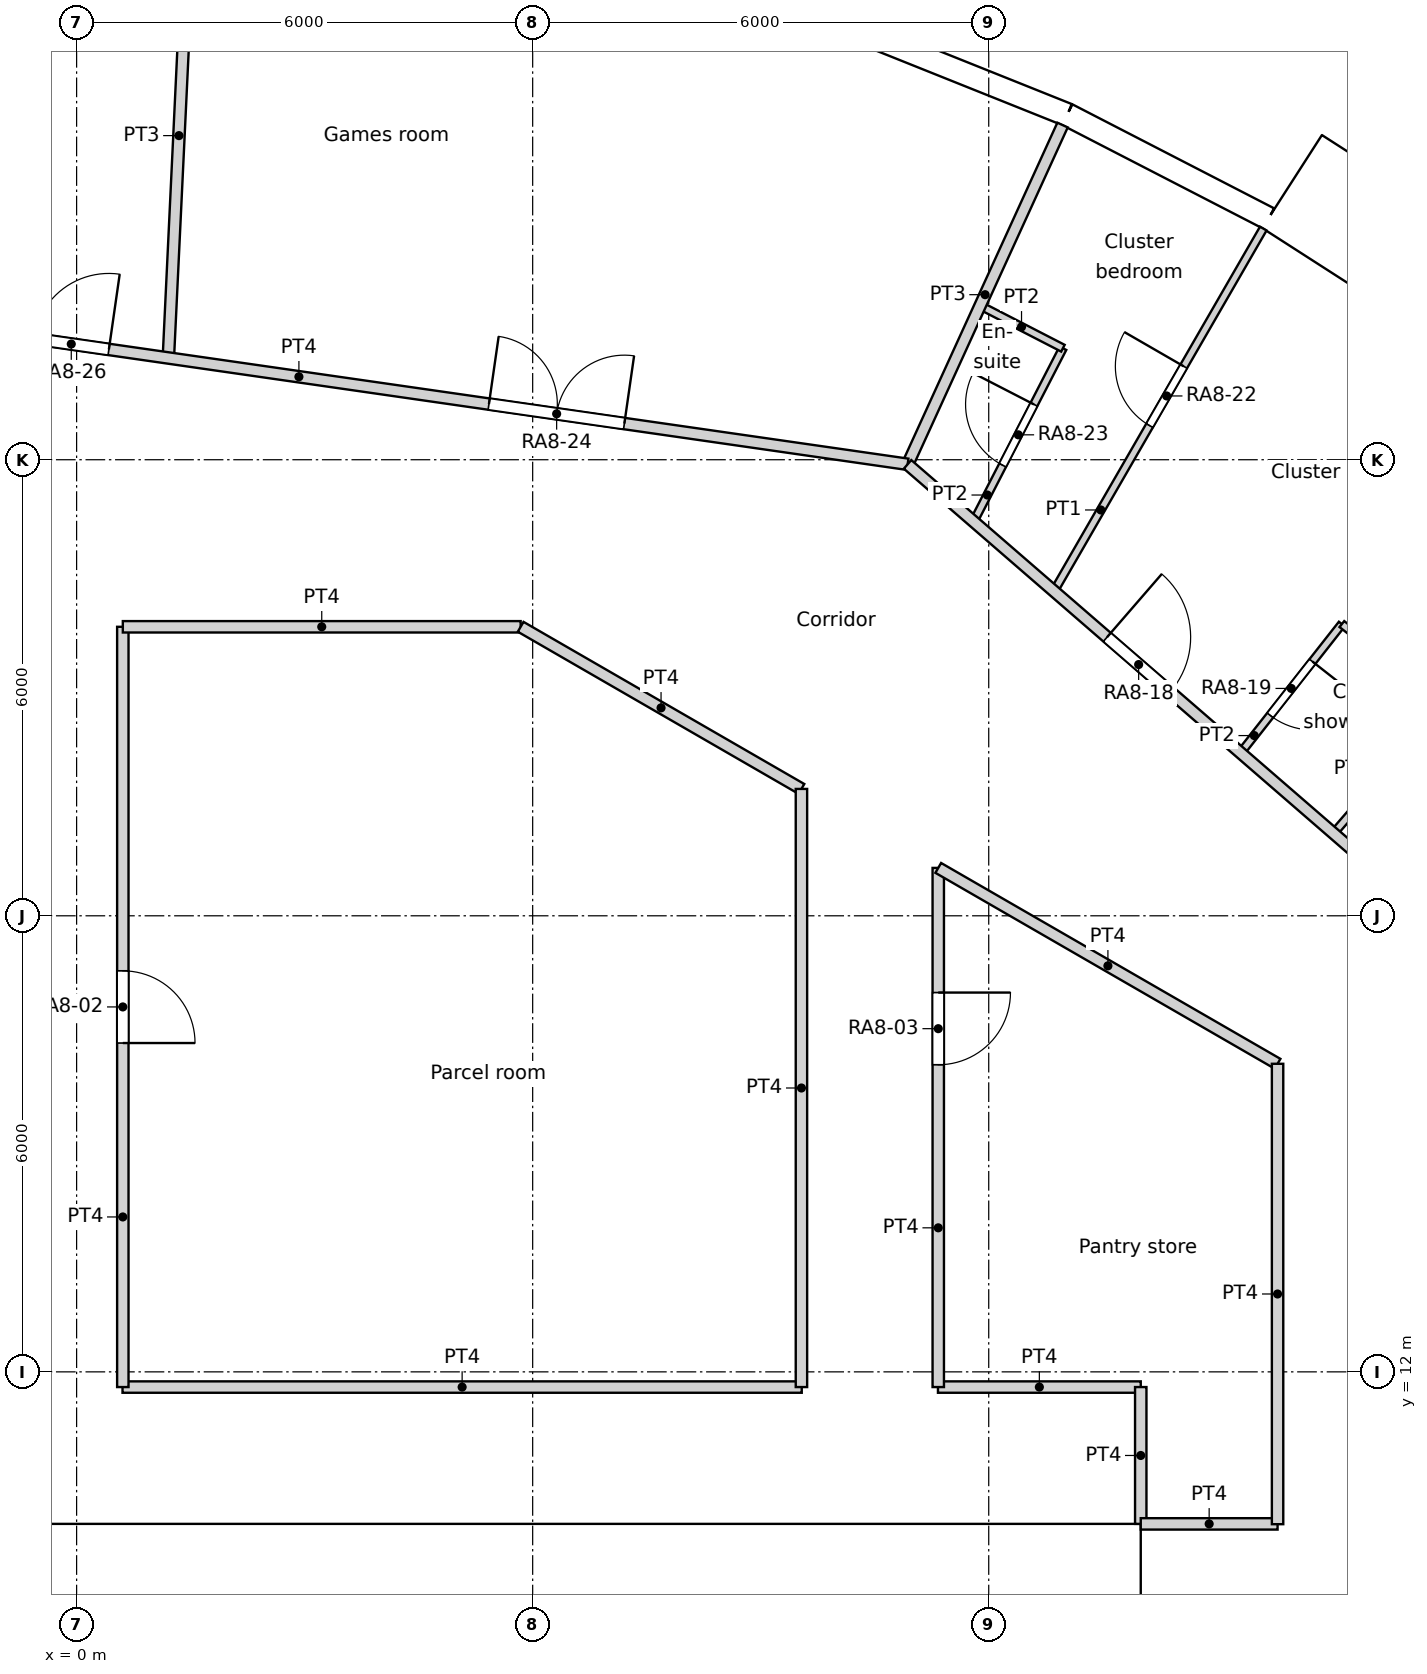
"""IFC4 building model, lengths in metres.
Left out: names, types, materials, properties, quantities, classifications, styles, units other than length and angle.
Written with IfcOpenShell. Run it as: python <this file> out.ifc"""

import sys

from ifc_helpers import new_model, si_unit, direction, frame, frame_2d, origin, origin_2d, place, context, subcontext, project, spatial, rectangle, circle, extrude, element, fill, save


model = new_model("IFC4")
c1 = context("Model", 3, precision=1e-05, world=origin(), true_north=direction((0.0, 1.0)))
c2 = subcontext(c1, "Body", "Model", "MODEL_VIEW")
j1 = project(units=[si_unit("LENGTHUNIT", "METRE"), si_unit("PLANEANGLEUNIT", "RADIAN")], contexts=[c1])
p1 = place(None, origin())
s1 = spatial("IfcSite", under=j1, at=p1, CompositionType="ELEMENT")
p2 = place(p1, origin())
s2 = spatial("IfcBuilding", under=s1, at=p2, CompositionType="ELEMENT")
p3 = place(p2, frame((0.0, 0.0, 103.8)))
s3 = spatial("IfcBuildingStorey", under=s2, at=p3, CompositionType="ELEMENT", Elevation=103.8)
for number, where, z_axis, x_axis in (
    (1, (12.576, 27.539, 0.0), (0.0, 0.0, 1.0), (1.0, 0.0, 0.0)),
    (2, (7.137, 29.421, 0.0), (0.0, 0.0, 1.0), (1.0, 0.0, 0.0)),
):
    element("IfcColumn", number, at=place(p3, frame(where, z_axis=z_axis, x_axis=x_axis)), inside=s3, PredefinedType="COLUMN", context=c2, shape_type="SweptSolid", body=[
        extrude(circle(Radius=0.6, at=origin_2d()), origin(), (0.0, 0.0, 1.0), 3.6),
    ])
for number, where, z_axis, x_axis in (
    (3, (14.659, 19.69, 0.0), (0.0, 0.0, 1.0), (1.0, 0.0, 0.0)),
    (4, (9.723, 22.54, 0.0), (0.0, 0.0, 1.0), (1.0, 0.0, 0.0)),
    (5, (4.263, 24.175, 0.0), (0.0, 0.0, 1.0), (1.0, 0.0, 0.0)),
):
    element("IfcColumn", number, at=place(p3, frame(where, z_axis=z_axis, x_axis=x_axis)), inside=s3, PredefinedType="COLUMN", context=c2, shape_type="SweptSolid", body=[
        extrude(circle(Radius=0.65, at=origin_2d()), origin(), (0.0, 0.0, 1.0), 3.6),
    ])
for number, where, z_axis, x_axis in (
    (6, (15.552, 10.603, 0.0), (0.0, 0.0, 1.0), (1.0, 0.0, 0.0)),
    (7, (11.735, 14.716, 0.0), (0.0, 0.0, 1.0), (1.0, 0.0, 0.0)),
    (8, (6.876, 17.521, 0.0), (0.0, 0.0, 1.0), (1.0, 0.0, 0.0)),
    (9, (1.406, 18.77, 0.0), (0.0, 0.0, 1.0), (1.0, 0.0, 0.0)),
):
    element("IfcColumn", number, at=place(p3, frame(where, z_axis=z_axis, x_axis=x_axis)), inside=s3, PredefinedType="COLUMN", context=c2, shape_type="SweptSolid", body=[
        extrude(circle(Radius=0.7, at=origin_2d()), origin(), (0.0, 0.0, 1.0), 3.6),
    ])
p4 = place(p3, frame((18.516, 26.037, -0.45), z_axis=(0.0, 0.0, 1.0), x_axis=(-0.841223422347, 0.540687667415, 0.0)))
e10 = element("IfcWall", 10, at=p4, inside=s3, PredefinedType="ELEMENTEDWALL", context=c2, shape_type="SweptSolid", body=[
    extrude(rectangle(XDim=3.0, YDim=1.45, at=frame_2d((1.5, 0.0))), origin(), (0.0, 0.0, 1.0), 3.6),
])
p5 = place(p4, frame((1.5, 0.0, 2.0)))
e11 = element("IfcOpeningElement", 11, at=p5, cuts=e10, PredefinedType="OPENING", context=c2, shape_type="SweptSolid", body=[
    extrude(circle(Radius=0.9, at=origin_2d()), frame((0.0, 0.735, 0.0), z_axis=(0.0, -1.0, 0.0), x_axis=(1.0, 0.0, 0.0)), (0.0, 0.0, 1.0), 1.47),
])
p6 = place(p3, frame((15.682, 27.174, 0.0), z_axis=(0.0, 0.0, 1.0), x_axis=(-0.888819853856, 0.458256770153, 0.0)))
e12 = element("IfcWall", 12, at=p6, inside=s3, PredefinedType="SOLIDWALL", context=c2, shape_type="SweptSolid", body=[
    extrude(rectangle(XDim=2.98, YDim=0.3, at=frame_2d((1.49, 0.0))), origin(), (0.0, 0.0, 1.0), 3.15),
])
p7 = place(p6, frame((1.49, 0.0, 1.55)))
e13 = element("IfcOpeningElement", 13, at=p7, cuts=e12, PredefinedType="OPENING", context=c2, shape_type="SweptSolid", body=[
    extrude(circle(Radius=0.9, at=origin_2d()), frame((0.0, 0.16, 0.0), z_axis=(0.0, -1.0, 0.0), x_axis=(1.0, 0.0, 0.0)), (0.0, 0.0, 1.0), 0.32),
])
p8 = place(p3, frame((13.033, 28.539, 0.0), z_axis=(0.0, 0.0, 1.0), x_axis=(-0.928403213937, 0.371574316054, 0.0)))
e14 = element("IfcWall", 14, at=p8, inside=s3, PredefinedType="SOLIDWALL", context=c2, shape_type="SweptSolid", body=[
    extrude(rectangle(XDim=2.98, YDim=0.3, at=frame_2d((1.49, 0.0))), origin(), (0.0, 0.0, 1.0), 3.15),
])
p9 = place(p8, frame((1.49, 0.0, 1.55)))
e15 = element("IfcOpeningElement", 15, at=p9, cuts=e14, PredefinedType="OPENING", context=c2, shape_type="SweptSolid", body=[
    extrude(circle(Radius=0.9, at=origin_2d()), frame((0.0, 0.16, 0.0), z_axis=(0.0, -1.0, 0.0), x_axis=(1.0, 0.0, 0.0)), (0.0, 0.0, 1.0), 0.32),
])
p10 = place(p3, frame((-14.0, 9.4, 0.0), z_axis=(0.0, 0.0, 1.0), x_axis=(1.0, 0.0, 0.0)))
e16 = element("IfcWall", 16, at=p10, inside=s3, PredefinedType="SOLIDWALL", context=c2, shape_type="SweptSolid", body=[
    extrude(rectangle(XDim=28.0, YDim=1.2, at=frame_2d((14.0, 0.0))), origin(), (0.0, 0.0, 1.0), 3.6),
])
p11 = place(p10, frame((9.8, 0.0, 0.0)))
e17 = element("IfcOpeningElement", 17, at=p11, cuts=e16, PredefinedType="OPENING", context=c2, shape_type="SweptSolid", body=[
    extrude(rectangle(XDim=1.8, YDim=2.1, at=frame_2d((0.9, 1.05))), frame((0.0, 0.6, 0.0), z_axis=(0.0, -1.0, 0.0), x_axis=(1.0, 0.0, 0.0)), (0.0, 0.0, 1.0), 1.2),
])
p12 = place(p3, frame((0.604, 11.8, 0.0), z_axis=(0.0, 0.0, 1.0), x_axis=(1.0, 0.0, 0.0)))
e18 = element("IfcWall", 18, at=p12, inside=s3, PredefinedType="PARTITIONING", context=c2, shape_type="SweptSolid", body=[
    extrude(rectangle(XDim=8.936, YDim=0.15, at=frame_2d((4.468, 0.0))), origin(), (0.0, 0.0, 1.0), 3.15),
])
p13 = place(p3, frame((11.332, 11.8, 0.0), z_axis=(0.0, 0.0, 1.0), x_axis=(1.0, 0.0, 0.0)))
e19 = element("IfcWall", 19, at=p13, inside=s3, PredefinedType="PARTITIONING", context=c2, shape_type="SweptSolid", body=[
    extrude(rectangle(XDim=2.668, YDim=0.15, at=frame_2d((1.334, 0.0))), origin(), (0.0, 0.0, 1.0), 3.15),
])
for number, where, z_axis, x_axis in (
    (20, (14.0, 10.0, 0.0), (0.0, 0.0, 1.0), (0.0, 1.0, 0.0)),
    (21, (14.0, 10.0, 0.0), (0.0, 0.0, 1.0), (1.0, 0.0, 0.0)),
):
    element("IfcWall", number, at=place(p3, frame(where, z_axis=z_axis, x_axis=x_axis)), inside=s3, PredefinedType="PARTITIONING", context=c2, shape_type="SweptSolid", body=[
        extrude(rectangle(XDim=1.8, YDim=0.15, at=frame_2d((0.9, 0.0))), origin(), (0.0, 0.0, 1.0), 3.15),
    ])
p14 = place(p3, frame((15.8, 9.996, 0.0), z_axis=(0.0, 0.0, 1.0), x_axis=(0.0, 1.0, 0.0)))
e22 = element("IfcWall", 22, at=p14, inside=s3, PredefinedType="PARTITIONING", context=c2, shape_type="SweptSolid", body=[
    extrude(rectangle(XDim=6.057, YDim=0.15, at=frame_2d((3.028, 0.0))), origin(), (0.0, 0.0, 1.0), 3.15),
])
p15 = place(p3, frame((10.932, 23.939, 0.0), z_axis=(0.0, 0.0, 1.0), x_axis=(0.755838982892, -0.654757536757, 0.0)))
e23 = element("IfcWall", 23, at=p15, inside=s3, PredefinedType="PARTITIONING", context=c2, shape_type="SweptSolid", body=[
    extrude(rectangle(XDim=14.83, YDim=0.15, at=frame_2d((7.415, 0.0))), origin(), (0.0, 0.0, 1.0), 3.15),
])
p16 = place(p15, frame((12.796, 0.0, 0.0)))
e24 = element("IfcOpeningElement", 24, at=p16, cuts=e23, PredefinedType="OPENING", context=c2, shape_type="SweptSolid", body=[
    extrude(rectangle(XDim=1.0, YDim=2.1, at=frame_2d((0.5, 1.05))), frame((0.0, 0.075, 0.0), z_axis=(0.0, -1.0, 0.0), x_axis=(1.0, 0.0, 0.0)), (0.0, 0.0, 1.0), 0.15),
])
p17 = place(p15, frame((3.472, 0.0, 0.0)))
e25 = element("IfcOpeningElement", 25, at=p17, cuts=e23, PredefinedType="OPENING", context=c2, shape_type="SweptSolid", body=[
    extrude(rectangle(XDim=1.1, YDim=2.1, at=frame_2d((0.55, 1.05))), frame((0.0, 0.075, 0.0), z_axis=(0.0, -1.0, 0.0), x_axis=(1.0, 0.0, 0.0)), (0.0, 0.0, 1.0), 0.15),
])
p18 = place(p3, frame((9.536, 11.8, 0.0), z_axis=(0.0, 0.0, 1.0), x_axis=(0.0, 1.0, 0.0)))
e26 = element("IfcWall", 26, at=p18, inside=s3, PredefinedType="PARTITIONING", context=c2, shape_type="SweptSolid", body=[
    extrude(rectangle(XDim=7.869, YDim=0.15, at=frame_2d((3.935, 0.0))), origin(), (0.0, 0.0, 1.0), 3.15),
])
p19 = place(p3, frame((5.842, 21.802, 0.0), z_axis=(0.0, 0.0, 1.0), x_axis=(0.865983505205, -0.500072563448, 0.0)))
e27 = element("IfcWall", 27, at=p19, inside=s3, PredefinedType="PARTITIONING", context=c2, shape_type="SweptSolid", body=[
    extrude(rectangle(XDim=4.265, YDim=0.15, at=frame_2d((2.133, 0.0))), origin(), (0.0, 0.0, 1.0), 3.15),
])
p20 = place(p3, frame((0.608, 21.802, 0.0), z_axis=(0.0, 0.0, 1.0), x_axis=(1.0, 0.0, 0.0)))
e28 = element("IfcWall", 28, at=p20, inside=s3, PredefinedType="PARTITIONING", context=c2, shape_type="SweptSolid", body=[
    extrude(rectangle(XDim=5.234, YDim=0.15, at=frame_2d((2.617, 0.0))), origin(), (0.0, 0.0, 1.0), 3.15),
])
p21 = place(p3, frame((0.608, 11.8, 0.0), z_axis=(0.0, 0.0, 1.0), x_axis=(0.0, 1.0, 0.0)))
e29 = element("IfcWall", 29, at=p21, inside=s3, PredefinedType="PARTITIONING", context=c2, shape_type="SweptSolid", body=[
    extrude(rectangle(XDim=10.002, YDim=0.15, at=frame_2d((5.001, 0.0))), origin(), (0.0, 0.0, 1.0), 3.15),
])
p22 = place(p21, frame((4.526, 0.0, 0.0)))
e30 = element("IfcOpeningElement", 30, at=p22, cuts=e29, PredefinedType="OPENING", context=c2, shape_type="SweptSolid", body=[
    extrude(rectangle(XDim=0.95, YDim=2.1, at=frame_2d((0.475, 1.05))), frame((0.0, 0.075, 0.0), z_axis=(0.0, -1.0, 0.0), x_axis=(1.0, 0.0, 0.0)), (0.0, 0.0, 1.0), 0.15),
])
p23 = place(p3, frame((11.336, 18.63, 0.0), z_axis=(0.0, 0.0, 1.0), x_axis=(0.866063337164, -0.499934291702, 0.0)))
e31 = element("IfcWall", 31, at=p23, inside=s3, PredefinedType="PARTITIONING", context=c2, shape_type="SweptSolid", body=[
    extrude(rectangle(XDim=5.155, YDim=0.15, at=frame_2d((2.577, 0.0))), origin(), (0.0, 0.0, 1.0), 3.15),
])
p24 = place(p3, frame((11.336, 11.8, 0.0), z_axis=(0.0, 0.0, 1.0), x_axis=(0.0, 1.0, 0.0)))
e32 = element("IfcWall", 32, at=p24, inside=s3, PredefinedType="PARTITIONING", context=c2, shape_type="SweptSolid", body=[
    extrude(rectangle(XDim=6.83, YDim=0.15, at=frame_2d((3.415, 0.0))), origin(), (0.0, 0.0, 1.0), 3.15),
])
p25 = place(p24, frame((4.24, 0.0, 0.0)))
e33 = element("IfcOpeningElement", 33, at=p25, cuts=e32, PredefinedType="OPENING", context=c2, shape_type="SweptSolid", body=[
    extrude(rectangle(XDim=0.95, YDim=2.1, at=frame_2d((0.475, 1.05))), frame((0.0, 0.075, 0.0), z_axis=(0.0, -1.0, 0.0), x_axis=(1.0, 0.0, 0.0)), (0.0, 0.0, 1.0), 0.15),
])
p26 = place(p3, frame((-3.746, 26.051, 0.0), z_axis=(0.0, 0.0, 1.0), x_axis=(0.989821009857, -0.142317843033, 0.0)))
e34 = element("IfcWall", 34, at=p26, inside=s3, PredefinedType="PARTITIONING", context=c2, shape_type="SweptSolid", body=[
    extrude(rectangle(XDim=14.83, YDim=0.15, at=frame_2d((7.415, 0.0))), origin(), (0.0, 0.0, 1.0), 3.15),
])
p27 = place(p26, frame((9.265, 0.0, 0.0)))
e35 = element("IfcOpeningElement", 35, at=p27, cuts=e34, PredefinedType="OPENING", context=c2, shape_type="SweptSolid", body=[
    extrude(rectangle(XDim=1.8, YDim=2.1, at=frame_2d((0.9, 1.05))), frame((0.0, 0.075, 0.0), z_axis=(0.0, -1.0, 0.0), x_axis=(1.0, 0.0, 0.0)), (0.0, 0.0, 1.0), 0.15),
])
p28 = place(p26, frame((3.214, 0.0, 0.0)))
e36 = element("IfcOpeningElement", 36, at=p28, cuts=e34, PredefinedType="OPENING", context=c2, shape_type="SweptSolid", body=[
    extrude(rectangle(XDim=1.0, YDim=2.1, at=frame_2d((0.5, 1.05))), frame((0.0, 0.075, 0.0), z_axis=(0.0, -1.0, 0.0), x_axis=(1.0, 0.0, 0.0)), (0.0, 0.0, 1.0), 0.15),
])
p29 = place(p3, frame((16.646, 21.838, 0.0), z_axis=(0.0, 0.0, 1.0), x_axis=(0.78601333061, -0.618209547082, 0.0)))
e37 = element("IfcWall", 37, at=p29, inside=s3, PredefinedType="PARTITIONING", context=c2, shape_type="SweptSolid", body=[
    extrude(rectangle(XDim=1.723, YDim=0.1, at=frame_2d((0.861, 0.0))), origin(), (0.0, 0.0, 1.0), 3.15),
])
p30 = place(p3, frame((15.315, 20.144, 0.0), z_axis=(0.0, 0.0, 1.0), x_axis=(0.617871601496, 0.786279011588, 0.0)))
e38 = element("IfcWall", 38, at=p30, inside=s3, PredefinedType="PARTITIONING", context=c2, shape_type="SweptSolid", body=[
    extrude(rectangle(XDim=2.154, YDim=0.1, at=frame_2d((1.077, 0.0))), origin(), (0.0, 0.0, 1.0), 3.15),
])
p31 = place(p30, frame((0.627, 0.0, 0.0)))
e39 = element("IfcOpeningElement", 39, at=p31, cuts=e38, PredefinedType="OPENING", context=c2, shape_type="SweptSolid", body=[
    extrude(rectangle(XDim=0.9, YDim=2.0, at=frame_2d((0.45, 1.0))), frame((0.0, 0.05, 0.0), z_axis=(0.0, -1.0, 0.0), x_axis=(1.0, 0.0, 0.0)), (0.0, 0.0, 1.0), 0.1),
])
p32 = place(p3, frame((12.859, 22.272, 0.0), z_axis=(0.0, 0.0, 1.0), x_axis=(0.499968073049, 0.866043836033, 0.0)))
e40 = element("IfcWall", 40, at=p32, inside=s3, PredefinedType="PARTITIONING", context=c2, shape_type="SweptSolid", body=[
    extrude(rectangle(XDim=5.507, YDim=0.1, at=frame_2d((2.753, 0.0))), origin(), (0.0, 0.0, 1.0), 3.15),
])
p33 = place(p32, frame((2.514, 0.0, 0.0)))
e41 = element("IfcOpeningElement", 41, at=p33, cuts=e40, PredefinedType="OPENING", context=c2, shape_type="SweptSolid", body=[
    extrude(rectangle(XDim=0.9, YDim=2.1, at=frame_2d((0.45, 1.05))), frame((0.0, 0.05, 0.0), z_axis=(0.0, -1.0, 0.0), x_axis=(1.0, 0.0, 0.0)), (0.0, 0.0, 1.0), 0.1),
])
p34 = place(p3, frame((16.537, 19.085, 0.0), z_axis=(0.0, 0.0, 1.0), x_axis=(0.654922216086, 0.755696295397, 0.0)))
e42 = element("IfcWall", 42, at=p34, inside=s3, PredefinedType="PARTITIONING", context=c2, shape_type="SweptSolid", body=[
    extrude(rectangle(XDim=2.234, YDim=0.1, at=frame_2d((1.117, 0.0))), origin(), (0.0, 0.0, 1.0), 3.15),
])
p35 = place(p3, frame((11.802, 23.188, 0.0), z_axis=(0.0, 0.0, 1.0), x_axis=(0.457961150758, 0.888972206763, 0.0)))
e43 = element("IfcWall", 43, at=p35, inside=s3, PredefinedType="PARTITIONING", context=c2, shape_type="SweptSolid", body=[
    extrude(rectangle(XDim=2.564, YDim=0.1, at=frame_2d((1.282, 0.0))), origin(), (0.0, 0.0, 1.0), 3.15),
])
p36 = place(p35, frame((0.832, 0.0, 0.0)))
e44 = element("IfcOpeningElement", 44, at=p36, cuts=e43, PredefinedType="OPENING", context=c2, shape_type="SweptSolid", body=[
    extrude(rectangle(XDim=0.9, YDim=2.04, at=frame_2d((0.45, 1.02))), frame((0.0, 0.05, 0.0), z_axis=(0.0, -1.0, 0.0), x_axis=(1.0, 0.0, 0.0)), (0.0, 0.0, 1.0), 0.1),
])
p37 = place(p3, frame((11.887, 26.028, 0.0), z_axis=(0.0, 0.0, 1.0), x_axis=(0.888981931645, -0.457942272791, 0.0)))
e45 = element("IfcWall", 45, at=p37, inside=s3, PredefinedType="PARTITIONING", context=c2, shape_type="SweptSolid", body=[
    extrude(rectangle(XDim=1.225, YDim=0.1, at=frame_2d((0.613, 0.0))), origin(), (0.0, 0.0, 1.0), 3.15),
])
p38 = place(p3, frame((10.934, 23.94, 0.0), z_axis=(0.0, 0.0, 1.0), x_axis=(0.415204619086, 0.909728049633, 0.0)))
e46 = element("IfcWall", 46, at=p38, inside=s3, PredefinedType="PARTITIONING", context=c2, shape_type="SweptSolid", body=[
    extrude(rectangle(XDim=4.906, YDim=0.15, at=frame_2d((2.453, 0.0))), origin(), (0.0, 0.0, 1.0), 3.15),
])
p39 = place(p3, frame((1.207, 25.339, 0.0), z_axis=(0.0, 0.0, 1.0), x_axis=(0.047648334785, 0.998864173045, 0.0)))
e47 = element("IfcWall", 47, at=p39, inside=s3, PredefinedType="PARTITIONING", context=c2, shape_type="SweptSolid", body=[
    extrude(rectangle(XDim=5.856, YDim=0.15, at=frame_2d((2.928, 0.0))), origin(), (0.0, 0.0, 1.0), 3.15),
])
p40 = place(p5, origin())
e48 = element("IfcWindow", 48, at=p40, inside=s3, PartitioningType="SINGLE_PANEL", PredefinedType="WINDOW", context=c2, shape_type="SweptSolid", body=[
    extrude(circle(Radius=0.9, at=origin_2d()), frame((0.0, 0.695, 0.0), z_axis=(0.0, -1.0, 0.0), x_axis=(1.0, 0.0, 0.0)), (0.0, 0.0, 1.0), 0.1),
])
fill(e11, e48)
p41 = place(p7, origin())
e49 = element("IfcWindow", 49, at=p41, inside=s3, PartitioningType="SINGLE_PANEL", PredefinedType="WINDOW", context=c2, shape_type="SweptSolid", body=[
    extrude(circle(Radius=0.9, at=origin_2d()), frame((0.0, 0.12, 0.0), z_axis=(0.0, -1.0, 0.0), x_axis=(1.0, 0.0, 0.0)), (0.0, 0.0, 1.0), 0.1),
])
fill(e13, e49)
p42 = place(p9, origin())
e50 = element("IfcWindow", 50, at=p42, inside=s3, PartitioningType="SINGLE_PANEL", PredefinedType="WINDOW", context=c2, shape_type="SweptSolid", body=[
    extrude(circle(Radius=0.9, at=origin_2d()), frame((0.0, 0.12, 0.0), z_axis=(0.0, -1.0, 0.0), x_axis=(1.0, 0.0, 0.0)), (0.0, 0.0, 1.0), 0.1),
])
fill(e15, e50)
p43 = place(p22, origin())
e51 = element("IfcDoor", 51, at=p43, inside=s3, OperationType="SINGLE_SWING_RIGHT", PredefinedType="DOOR", context=c2, shape_type="SweptSolid", body=[
    extrude(rectangle(XDim=0.95, YDim=2.1, at=frame_2d((0.475, 1.05))), frame((0.0, 0.025, 0.0), z_axis=(0.0, -1.0, 0.0), x_axis=(1.0, 0.0, 0.0)), (0.0, 0.0, 1.0), 0.05),
])
fill(e30, e51)
p44 = place(p25, origin())
e52 = element("IfcDoor", 52, at=p44, inside=s3, OperationType="SINGLE_SWING_LEFT", PredefinedType="DOOR", context=c2, shape_type="SweptSolid", body=[
    extrude(rectangle(XDim=0.95, YDim=2.1, at=frame_2d((0.475, 1.05))), frame((0.0, 0.025, 0.0), z_axis=(0.0, -1.0, 0.0), x_axis=(1.0, 0.0, 0.0)), (0.0, 0.0, 1.0), 0.05),
])
fill(e33, e52)
p45 = place(p17, origin())
e53 = element("IfcDoor", 53, at=p45, inside=s3, OperationType="SINGLE_SWING_LEFT", PredefinedType="DOOR", context=c2, shape_type="SweptSolid", body=[
    extrude(rectangle(XDim=1.1, YDim=2.1, at=frame_2d((0.55, 1.05))), frame((0.0, 0.025, 0.0), z_axis=(0.0, -1.0, 0.0), x_axis=(1.0, 0.0, 0.0)), (0.0, 0.0, 1.0), 0.05),
])
fill(e25, e53)
p46 = place(p31, origin())
e54 = element("IfcDoor", 54, at=p46, inside=s3, OperationType="SINGLE_SWING_LEFT", PredefinedType="DOOR", context=c2, shape_type="SweptSolid", body=[
    extrude(rectangle(XDim=0.9, YDim=2.0, at=frame_2d((0.45, 1.0))), frame((0.0, 0.025, 0.0), z_axis=(0.0, -1.0, 0.0), x_axis=(1.0, 0.0, 0.0)), (0.0, 0.0, 1.0), 0.05),
])
fill(e39, e54)
p47 = place(p33, origin())
e55 = element("IfcDoor", 55, at=p47, inside=s3, OperationType="SINGLE_SWING_RIGHT", PredefinedType="DOOR", context=c2, shape_type="SweptSolid", body=[
    extrude(rectangle(XDim=0.9, YDim=2.1, at=frame_2d((0.45, 1.05))), frame((0.0, 0.025, 0.0), z_axis=(0.0, -1.0, 0.0), x_axis=(1.0, 0.0, 0.0)), (0.0, 0.0, 1.0), 0.05),
])
fill(e41, e55)
p48 = place(p36, origin())
e56 = element("IfcDoor", 56, at=p48, inside=s3, OperationType="SINGLE_SWING_RIGHT", PredefinedType="DOOR", context=c2, shape_type="SweptSolid", body=[
    extrude(rectangle(XDim=0.9, YDim=2.04, at=frame_2d((0.45, 1.02))), frame((0.0, 0.025, 0.0), z_axis=(0.0, -1.0, 0.0), x_axis=(1.0, 0.0, 0.0)), (0.0, 0.0, 1.0), 0.05),
])
fill(e44, e56)
p49 = place(p27, origin())
e57 = element("IfcDoor", 57, at=p49, inside=s3, OperationType="DOUBLE_DOOR_SINGLE_SWING", PredefinedType="DOOR", context=c2, shape_type="SweptSolid", body=[
    extrude(rectangle(XDim=1.8, YDim=2.1, at=frame_2d((0.9, 1.05))), frame((0.0, 0.025, 0.0), z_axis=(0.0, -1.0, 0.0), x_axis=(1.0, 0.0, 0.0)), (0.0, 0.0, 1.0), 0.05),
])
fill(e35, e57)
p50 = place(p28, origin())
e58 = element("IfcDoor", 58, at=p50, inside=s3, OperationType="SINGLE_SWING_RIGHT", PredefinedType="DOOR", context=c2, shape_type="SweptSolid", body=[
    extrude(rectangle(XDim=1.0, YDim=2.1, at=frame_2d((0.5, 1.05))), frame((0.0, 0.025, 0.0), z_axis=(0.0, -1.0, 0.0), x_axis=(1.0, 0.0, 0.0)), (0.0, 0.0, 1.0), 0.05),
])
fill(e36, e58)
save(model, sys.argv[1])
